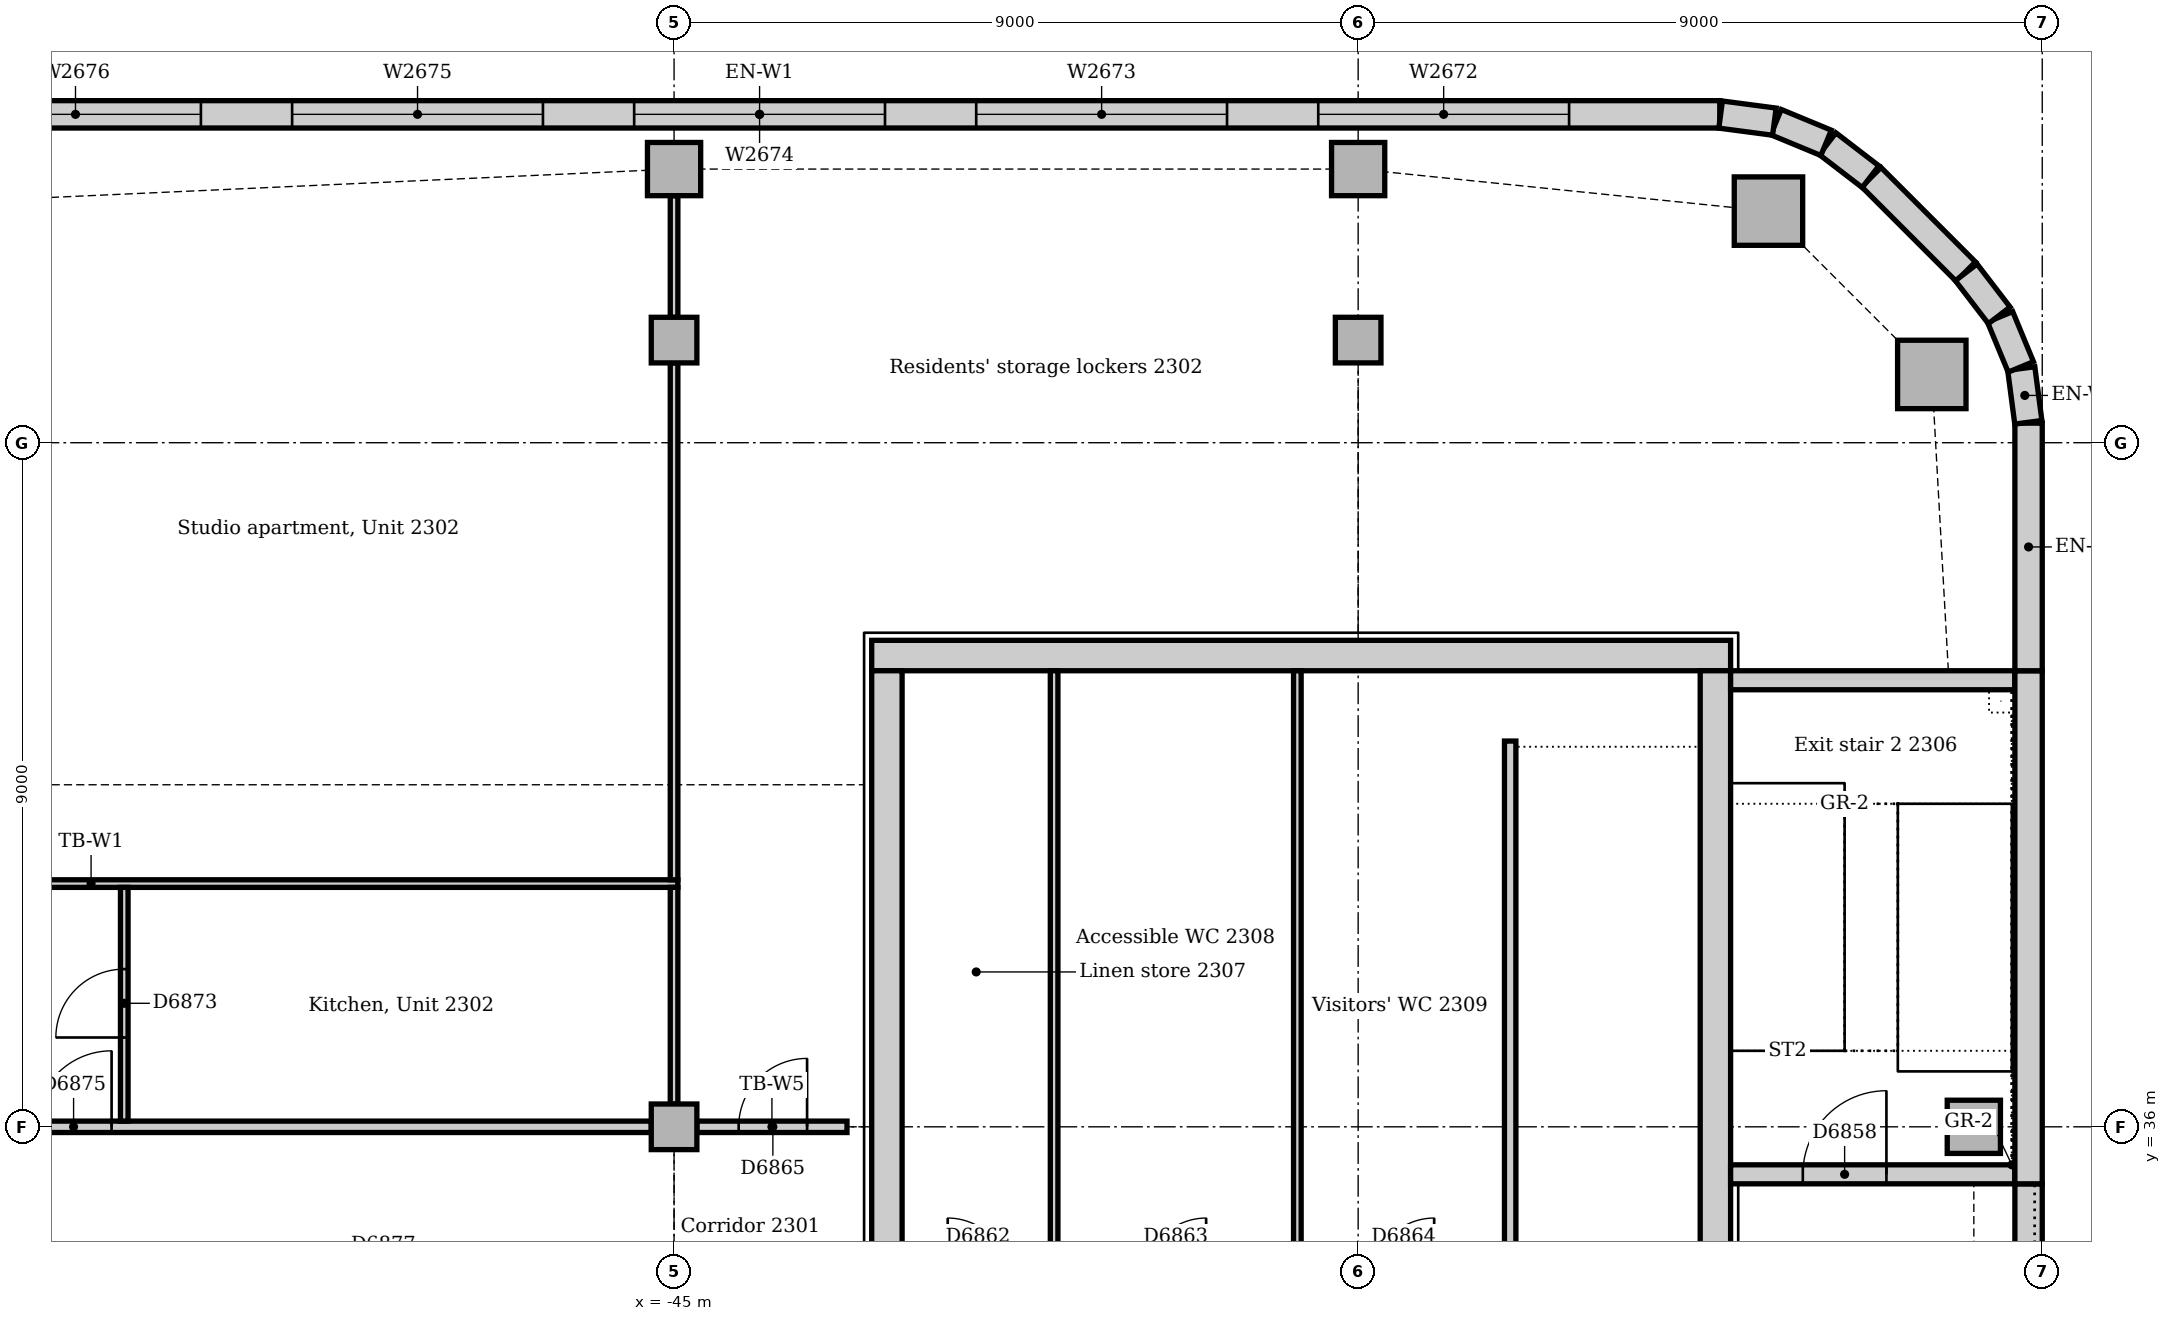
"""IFC4 building model, lengths in metres.
Left out: names, types, materials, properties, quantities, classifications, styles, units other than length and angle.
Written with IfcOpenShell. Run it as: python <this file> out.ifc"""

import sys

from ifc_helpers import new_model, si_unit, direction, frame, frame_2d, origin, origin_2d, place, context, subcontext, project, spatial, rectangle, extrude, element, fill, save


model = new_model("IFC4")
c1 = context("Model", 3, precision=1e-05, world=origin(), true_north=direction((0.0, 1.0)))
c2 = subcontext(c1, "Body", "Model", "MODEL_VIEW")
j1 = project(units=[si_unit("LENGTHUNIT", "METRE"), si_unit("PLANEANGLEUNIT", "RADIAN")], contexts=[c1])
p1 = place(None, origin())
s1 = spatial("IfcSite", under=j1, at=p1, CompositionType="ELEMENT")
p2 = place(p1, origin())
s2 = spatial("IfcBuilding", under=s1, at=p2, CompositionType="ELEMENT")
p3 = place(p2, frame((0.0, 0.0, 100.0)))
s3 = spatial("IfcBuildingStorey", under=s2, at=p3, CompositionType="ELEMENT", Elevation=100.0)
p4 = place(p3, frame((-31.1, 42.2, 0.0), z_axis=(0.0, 0.0, 1.0), x_axis=(-1.0, 0.0, 0.0)))
e1 = element("IfcWall", 1, at=p4, inside=s3, PredefinedType="SOLIDWALL", context=c2, shape_type="SweptSolid", body=[
    extrude(rectangle(XDim=11.3, YDim=0.4, at=frame_2d((5.65, 0.0))), origin(), (0.0, 0.0, 1.0), 4.0),
])
p5 = place(p3, frame((-31.3, 30.5, 0.0), z_axis=(0.0, 0.0, 1.0), x_axis=(0.0, 1.0, 0.0)))
e2 = element("IfcWall", 2, at=p5, inside=s3, PredefinedType="SOLIDWALL", context=c2, shape_type="SweptSolid", body=[
    extrude(rectangle(XDim=11.5, YDim=0.4, at=frame_2d((5.75, 0.0))), origin(), (0.0, 0.0, 1.0), 4.0),
])
p6 = place(p5, frame((0.85, 0.0, 0.0)))
e3 = element("IfcOpeningElement", 3, at=p6, cuts=e2, PredefinedType="OPENING", context=c2, shape_type="SweptSolid", body=[
    extrude(rectangle(XDim=1.8, YDim=2.1, at=frame_2d((0.9, 1.05))), frame((0.0, 0.21, 0.0), z_axis=(0.0, -1.0, 0.0), x_axis=(1.0, 0.0, 0.0)), (0.0, 0.0, 1.0), 0.42),
])
p7 = place(p3, frame((-42.2, 42.0, 0.0), z_axis=(0.0, 0.0, 1.0), x_axis=(0.0, -1.0, 0.0)))
e4 = element("IfcWall", 4, at=p7, inside=s3, PredefinedType="SOLIDWALL", context=c2, shape_type="SweptSolid", body=[
    extrude(rectangle(XDim=11.5, YDim=0.4, at=frame_2d((5.75, 0.0))), origin(), (0.0, 0.0, 1.0), 4.0),
])
p8 = place(p7, frame((8.85, 0.0, 0.0)))
e5 = element("IfcOpeningElement", 5, at=p8, cuts=e4, PredefinedType="OPENING", context=c2, shape_type="SweptSolid", body=[
    extrude(rectangle(XDim=1.8, YDim=2.1, at=frame_2d((0.9, 1.05))), frame((0.0, 0.21, 0.0), z_axis=(0.0, -1.0, 0.0), x_axis=(1.0, 0.0, 0.0)), (0.0, 0.0, 1.0), 0.42),
])
p9 = place(p3, frame((-31.1, 35.375, 0.0), z_axis=(0.0, 0.0, 1.0), x_axis=(1.0, 0.0, 0.0)))
e6 = element("IfcWall", 6, at=p9, inside=s3, PredefinedType="SOLIDWALL", context=c2, shape_type="SweptSolid", body=[
    extrude(rectangle(XDim=3.74, YDim=0.25, at=frame_2d((1.87, 0.0))), origin(), (0.0, 0.0, 1.0), 4.0),
])
p10 = place(p9, frame((0.95, 0.0, 0.0)))
e7 = element("IfcOpeningElement", 7, at=p10, cuts=e6, PredefinedType="OPENING", context=c2, shape_type="SweptSolid", body=[
    extrude(rectangle(XDim=1.1, YDim=2.1, at=frame_2d((0.55, 1.05))), frame((0.0, 0.135, 0.0), z_axis=(0.0, -1.0, 0.0), x_axis=(1.0, 0.0, 0.0)), (0.0, 0.0, 1.0), 0.27),
])
p11 = place(p3, frame((-27.36, 41.875, 0.0), z_axis=(0.0, 0.0, 1.0), x_axis=(-1.0, 0.0, 0.0)))
e8 = element("IfcWall", 8, at=p11, inside=s3, PredefinedType="SOLIDWALL", context=c2, shape_type="SweptSolid", body=[
    extrude(rectangle(XDim=3.74, YDim=0.25, at=frame_2d((1.87, 0.0))), origin(), (0.0, 0.0, 1.0), 4.0),
])
for number, where, z_axis, x_axis in (
    (9, (-28.453, 45.898, -0.15), (0.0, 0.0, 1.0), (1.0, 0.0, 0.0)),
    (10, (-30.602, 48.047, -0.15), (0.0, 0.0, 1.0), (1.0, 0.0, 0.0)),
):
    element("IfcColumn", number, at=place(p3, frame(where, z_axis=z_axis, x_axis=x_axis)), inside=s3, PredefinedType="COLUMN", context=c2, shape_type="SweptSolid", body=[
        extrude(rectangle(XDim=0.9, YDim=0.9, at=origin_2d()), origin(), (0.0, 0.0, 1.0), 4.0),
    ])
for number, where, z_axis, x_axis in (
    (11, (-27.9, 36.0, 0.0), (0.0, 0.0, 1.0), (1.0, 0.0, 0.0)),
    (12, (-45.0, 48.6, -0.15), (0.0, 0.0, 1.0), (1.0, 0.0, 0.0)),
    (13, (-36.0, 48.6, -0.15), (0.0, 0.0, 1.0), (1.0, 0.0, 0.0)),
):
    element("IfcColumn", number, at=place(p3, frame(where, z_axis=z_axis, x_axis=x_axis)), inside=s3, PredefinedType="COLUMN", context=c2, shape_type="SweptSolid", body=[
        extrude(rectangle(XDim=0.7, YDim=0.7, at=origin_2d()), origin(), (0.0, 0.0, 1.0), 4.0),
    ])
for number, where, z_axis, x_axis in (
    (14, (-45.0, 36.0, 0.0), (0.0, 0.0, 1.0), (1.0, 0.0, 0.0)),
    (15, (-45.0, 46.35, 0.0), (0.0, 0.0, 1.0), (1.0, 0.0, 0.0)),
    (16, (-36.0, 46.35, 0.0), (0.0, 0.0, 1.0), (1.0, 0.0, 0.0)),
):
    element("IfcColumn", number, at=place(p3, frame(where, z_axis=z_axis, x_axis=x_axis)), inside=s3, PredefinedType="COLUMN", context=c2, shape_type="SweptSolid", body=[
        extrude(rectangle(XDim=0.6, YDim=0.6, at=origin_2d()), origin(), (0.0, 0.0, 1.0), 3.85),
    ])
p12 = place(p3, frame((-27.18, 27.75, 0.0), z_axis=(0.0, 0.0, 1.0), x_axis=(0.0, 1.0, 0.0)))
e17 = element("IfcWall", 17, at=p12, inside=s3, PredefinedType="STANDARD", context=c2, shape_type="SweptSolid", body=[
    extrude(rectangle(XDim=7.5, YDim=0.36, at=frame_2d((3.75, 0.0))), origin(), (0.0, 0.0, 1.0), 3.85),
])
p13 = place(p12, frame((2.85, 0.0, 1.2)))
e18 = element("IfcOpeningElement", 18, at=p13, cuts=e17, PredefinedType="OPENING", context=c2, shape_type="SweptSolid", body=[
    extrude(rectangle(XDim=1.8, YDim=1.2, at=frame_2d((0.9, 0.6))), frame((0.0, 0.19, 0.0), z_axis=(0.0, -1.0, 0.0), x_axis=(1.0, 0.0, 0.0)), (0.0, 0.0, 1.0), 0.38),
])
p14 = place(p3, frame((-27.18, 35.25, 0.0), z_axis=(0.0, 0.0, 1.0), x_axis=(0.0, 1.0, 0.0)))
e19 = element("IfcWall", 19, at=p14, inside=s3, PredefinedType="STANDARD", context=c2, shape_type="SweptSolid", body=[
    extrude(rectangle(XDim=6.75, YDim=0.36, at=frame_2d((3.375, 0.0))), origin(), (0.0, 0.0, 1.0), 3.85),
])
p15 = place(p3, frame((-27.18, 42.0, 0.0), z_axis=(0.0, 0.0, 1.0), x_axis=(0.0, 1.0, 0.0)))
e20 = element("IfcWall", 20, at=p15, inside=s3, PredefinedType="STANDARD", context=c2, shape_type="SweptSolid", body=[
    extrude(rectangle(XDim=3.257, YDim=0.36, at=frame_2d((1.629, 0.0))), origin(), (0.0, 0.0, 1.0), 3.85),
])
p16 = place(p3, frame((-28.006, 47.251, 0.0), z_axis=(0.0, 0.0, 1.0), x_axis=(-0.707106781187, 0.707106781187, 0.0)))
e21 = element("IfcWall", 21, at=p16, inside=s3, PredefinedType="STANDARD", context=c2, shape_type="SweptSolid", body=[
    extrude(rectangle(XDim=1.757, YDim=0.36, at=frame_2d((0.879, 0.0))), origin(), (0.0, 0.0, 1.0), 3.85),
])
p17 = place(p3, frame((-31.243, 49.32, 0.0), z_axis=(0.0, 0.0, 1.0), x_axis=(-1.0, 0.0, 0.0)))
e22 = element("IfcWall", 22, at=p17, inside=s3, PredefinedType="STANDARD", context=c2, shape_type="SweptSolid", body=[
    extrude(rectangle(XDim=25.265, YDim=0.36, at=frame_2d((12.632, 0.0))), origin(), (0.0, 0.0, 1.0), 3.85),
])
p18 = place(p17, frame((1.982, 0.0, 0.9)))
e23 = element("IfcOpeningElement", 23, at=p18, cuts=e22, PredefinedType="OPENING", context=c2, shape_type="SweptSolid", body=[
    extrude(rectangle(XDim=3.3, YDim=1.6, at=frame_2d((1.65, 0.8))), frame((0.0, 0.19, 0.0), z_axis=(0.0, -1.0, 0.0), x_axis=(1.0, 0.0, 0.0)), (0.0, 0.0, 1.0), 0.38),
])
p19 = place(p17, frame((6.482, 0.0, 0.9)))
e24 = element("IfcOpeningElement", 24, at=p19, cuts=e22, PredefinedType="OPENING", context=c2, shape_type="SweptSolid", body=[
    extrude(rectangle(XDim=3.3, YDim=1.6, at=frame_2d((1.65, 0.8))), frame((0.0, 0.19, 0.0), z_axis=(0.0, -1.0, 0.0), x_axis=(1.0, 0.0, 0.0)), (0.0, 0.0, 1.0), 0.38),
])
p20 = place(p17, frame((10.982, 0.0, 0.9)))
e25 = element("IfcOpeningElement", 25, at=p20, cuts=e22, PredefinedType="OPENING", context=c2, shape_type="SweptSolid", body=[
    extrude(rectangle(XDim=3.3, YDim=1.6, at=frame_2d((1.65, 0.8))), frame((0.0, 0.19, 0.0), z_axis=(0.0, -1.0, 0.0), x_axis=(1.0, 0.0, 0.0)), (0.0, 0.0, 1.0), 0.38),
])
p21 = place(p17, frame((15.482, 0.0, 0.9)))
e26 = element("IfcOpeningElement", 26, at=p21, cuts=e22, PredefinedType="OPENING", context=c2, shape_type="SweptSolid", body=[
    extrude(rectangle(XDim=3.3, YDim=1.6, at=frame_2d((1.65, 0.8))), frame((0.0, 0.19, 0.0), z_axis=(0.0, -1.0, 0.0), x_axis=(1.0, 0.0, 0.0)), (0.0, 0.0, 1.0), 0.38),
])
p22 = place(p17, frame((19.982, 0.0, 0.9)))
e27 = element("IfcOpeningElement", 27, at=p22, cuts=e22, PredefinedType="OPENING", context=c2, shape_type="SweptSolid", body=[
    extrude(rectangle(XDim=3.3, YDim=1.6, at=frame_2d((1.65, 0.8))), frame((0.0, 0.19, 0.0), z_axis=(0.0, -1.0, 0.0), x_axis=(1.0, 0.0, 0.0)), (0.0, 0.0, 1.0), 0.38),
])
for number, where, z_axis, x_axis in (
    (28, (-27.183, 45.269, 0.0), (0.0, 0.0, 1.0), (-0.131, 0.991, 0.0)),
    (29, (-27.282, 45.997, 0.0), (0.0, 0.0, 1.0), (-0.383, 0.924, 0.0)),
):
    element("IfcWall", number, at=place(p3, frame(where, z_axis=z_axis, x_axis=x_axis)), inside=s3, PredefinedType="STANDARD", context=c2, shape_type="SweptSolid", body=[
        extrude(rectangle(XDim=0.713, YDim=0.36, at=frame_2d((0.356, 0.0))), origin(), (0.0, 0.0, 1.0), 3.85),
    ])
for number, where, z_axis, x_axis in (
    (30, (-27.566, 46.675, 0.0), (0.0, 0.0, 1.0), (-0.609, 0.793, 0.0)),
    (31, (-29.259, 48.5, 0.0), (0.0, 0.0, 1.0), (-0.793, 0.609, 0.0)),
):
    element("IfcWall", number, at=place(p3, frame(where, z_axis=z_axis, x_axis=x_axis)), inside=s3, PredefinedType="STANDARD", context=c2, shape_type="SweptSolid", body=[
        extrude(rectangle(XDim=0.713, YDim=0.36, at=frame_2d((0.357, 0.0))), origin(), (0.0, 0.0, 1.0), 3.85),
    ])
for number, where, z_axis, x_axis in (
    (32, (-29.844, 48.945, 0.0), (0.0, 0.0, 1.0), (-0.924, 0.383, 0.0)),
    (33, (-30.524, 49.224, 0.0), (0.0, 0.0, 1.0), (-0.991, 0.131, 0.0)),
):
    element("IfcWall", number, at=place(p3, frame(where, z_axis=z_axis, x_axis=x_axis)), inside=s3, PredefinedType="STANDARD", context=c2, shape_type="SweptSolid", body=[
        extrude(rectangle(XDim=0.713, YDim=0.36, at=frame_2d((0.356, 0.0))), origin(), (0.0, 0.0, 1.0), 3.85),
    ])
p23 = place(p3, frame((-34.0, 41.075, 0.0), z_axis=(0.0, 0.0, 1.0), x_axis=(0.0, -1.0, 0.0)))
e34 = element("IfcWall", 34, at=p23, inside=s3, PredefinedType="SOLIDWALL", context=c2, shape_type="SweptSolid", body=[
    extrude(rectangle(XDim=7.0, YDim=0.15, at=frame_2d((3.5, 0.0))), origin(), (0.0, 0.0, 1.0), 4.0),
])
for number, where, z_axis, x_axis in (
    (35, (-40.0, 34.075, 0.0), (0.0, 0.0, 1.0), (0.0, 1.0, 0.0)),
    (36, (-36.8, 34.075, 0.0), (0.0, 0.0, 1.0), (0.0, 1.0, 0.0)),
):
    element("IfcWall", number, at=place(p3, frame(where, z_axis=z_axis, x_axis=x_axis)), inside=s3, PredefinedType="PARTITIONING", context=c2, shape_type="SweptSolid", body=[
        extrude(rectangle(XDim=7.925, YDim=0.1, at=frame_2d((3.962, 0.0))), origin(), (0.0, 0.0, 1.0), 3.85),
    ])
p24 = place(p3, frame((-44.7, 36.0, 0.0), z_axis=(0.0, 0.0, 1.0), x_axis=(1.0, 0.0, 0.0)))
e37 = element("IfcWall", 37, at=p24, inside=s3, PredefinedType="PARTITIONING", context=c2, shape_type="SweptSolid", body=[
    extrude(rectangle(XDim=1.975, YDim=0.15, at=frame_2d((0.988, 0.0))), origin(), (0.0, 0.0, 1.0), 3.602),
])
p25 = place(p24, frame((0.55, 0.0, 0.0)))
e38 = element("IfcOpeningElement", 38, at=p25, cuts=e37, PredefinedType="OPENING", context=c2, shape_type="SweptSolid", body=[
    extrude(rectangle(XDim=0.9, YDim=2.1, at=frame_2d((0.45, 1.05))), frame((0.0, 0.085, 0.0), z_axis=(0.0, -1.0, 0.0), x_axis=(1.0, 0.0, 0.0)), (0.0, 0.0, 1.0), 0.17),
])
p26 = place(p3, frame((-53.7, 36.0, 0.0), z_axis=(0.0, 0.0, 1.0), x_axis=(1.0, 0.0, 0.0)))
e39 = element("IfcWall", 39, at=p26, inside=s3, PredefinedType="PARTITIONING", context=c2, shape_type="SweptSolid", body=[
    extrude(rectangle(XDim=8.4, YDim=0.15, at=frame_2d((4.2, 0.0))), origin(), (0.0, 0.0, 1.0), 3.262),
])
p27 = place(p26, frame((0.3, 0.0, 0.0)))
e40 = element("IfcOpeningElement", 40, at=p27, cuts=e39, PredefinedType="OPENING", context=c2, shape_type="SweptSolid", body=[
    extrude(rectangle(XDim=1.0, YDim=2.1, at=frame_2d((0.5, 1.05))), frame((0.0, 0.085, 0.0), z_axis=(0.0, -1.0, 0.0), x_axis=(1.0, 0.0, 0.0)), (0.0, 0.0, 1.0), 0.17),
])
p28 = place(p3, frame((-60.39, 39.2, 0.0), z_axis=(0.0, 0.0, 1.0), x_axis=(1.0, 0.0, 0.0)))
e41 = element("IfcWall", 41, at=p28, inside=s3, PredefinedType="PARTITIONING", context=c2, shape_type="SweptSolid", body=[
    extrude(rectangle(XDim=15.44, YDim=0.1, at=frame_2d((7.72, 0.0))), origin(), (0.0, 0.0, 1.0), 3.85),
])
p29 = place(p28, frame((6.021, 0.0, 0.0)))
e42 = element("IfcOpeningElement", 42, at=p29, cuts=e41, PredefinedType="OPENING", context=c2, shape_type="SweptSolid", body=[
    extrude(rectangle(XDim=0.9, YDim=2.1, at=frame_2d((0.45, 1.05))), frame((0.0, 0.06, 0.0), z_axis=(0.0, -1.0, 0.0), x_axis=(1.0, 0.0, 0.0)), (0.0, 0.0, 1.0), 0.12),
])
p30 = place(p3, frame((-45.0, 39.25, 0.0), z_axis=(0.0, 0.0, 1.0), x_axis=(0.0, 1.0, 0.0)))
e43 = element("IfcWall", 43, at=p30, inside=s3, PredefinedType="PARTITIONING", context=c2, shape_type="SweptSolid", body=[
    extrude(rectangle(XDim=6.8, YDim=0.1, at=frame_2d((3.4, 0.0))), origin(), (0.0, 0.0, 1.0), 3.362),
])
p31 = place(p3, frame((-45.0, 36.3, 0.0), z_axis=(0.0, 0.0, 1.0), x_axis=(0.0, 1.0, 0.0)))
e44 = element("IfcWall", 44, at=p31, inside=s3, PredefinedType="PARTITIONING", context=c2, shape_type="SweptSolid", body=[
    extrude(rectangle(XDim=2.85, YDim=0.1, at=frame_2d((1.425, 0.0))), origin(), (0.0, 0.0, 1.0), 3.362),
])
p32 = place(p3, frame((-45.0, 46.65, 0.0), z_axis=(0.0, 0.0, 1.0), x_axis=(0.0, 1.0, 0.0)))
e45 = element("IfcWall", 45, at=p32, inside=s3, PredefinedType="PARTITIONING", context=c2, shape_type="SweptSolid", body=[
    extrude(rectangle(XDim=1.6, YDim=0.1, at=frame_2d((0.8, 0.0))), origin(), (0.0, 0.0, 1.0), 3.652),
])
p33 = place(p3, frame((-52.233, 36.075, 0.0), z_axis=(0.0, 0.0, 1.0), x_axis=(0.0, 1.0, 0.0)))
e46 = element("IfcWall", 46, at=p33, inside=s3, PredefinedType="PARTITIONING", context=c2, shape_type="SweptSolid", body=[
    extrude(rectangle(XDim=3.075, YDim=0.1, at=frame_2d((1.538, 0.0))), origin(), (0.0, 0.0, 1.0), 3.85),
])
p34 = place(p33, frame((1.1, 0.0, 0.0)))
e47 = element("IfcOpeningElement", 47, at=p34, cuts=e46, PredefinedType="OPENING", context=c2, shape_type="SweptSolid", body=[
    extrude(rectangle(XDim=0.9, YDim=2.1, at=frame_2d((0.45, 1.05))), frame((0.0, 0.06, 0.0), z_axis=(0.0, -1.0, 0.0), x_axis=(1.0, 0.0, 0.0)), (0.0, 0.0, 1.0), 0.12),
])
p35 = place(p18, origin())
e48 = element("IfcWindow", 48, at=p35, inside=s3, PartitioningType="SINGLE_PANEL", PredefinedType="WINDOW", context=c2, shape_type="SweptSolid", body=[
    extrude(rectangle(XDim=3.3, YDim=1.6, at=frame_2d((1.65, 0.8))), frame((0.0, 0.13, 0.0), z_axis=(0.0, -1.0, 0.0), x_axis=(1.0, 0.0, 0.0)), (0.0, 0.0, 1.0), 0.06),
])
fill(e23, e48)
p36 = place(p19, origin())
e49 = element("IfcWindow", 49, at=p36, inside=s3, PartitioningType="SINGLE_PANEL", PredefinedType="WINDOW", context=c2, shape_type="SweptSolid", body=[
    extrude(rectangle(XDim=3.3, YDim=1.6, at=frame_2d((1.65, 0.8))), frame((0.0, 0.13, 0.0), z_axis=(0.0, -1.0, 0.0), x_axis=(1.0, 0.0, 0.0)), (0.0, 0.0, 1.0), 0.06),
])
fill(e24, e49)
p37 = place(p20, origin())
e50 = element("IfcWindow", 50, at=p37, inside=s3, PartitioningType="SINGLE_PANEL", PredefinedType="WINDOW", context=c2, shape_type="SweptSolid", body=[
    extrude(rectangle(XDim=3.3, YDim=1.6, at=frame_2d((1.65, 0.8))), frame((0.0, 0.13, 0.0), z_axis=(0.0, -1.0, 0.0), x_axis=(1.0, 0.0, 0.0)), (0.0, 0.0, 1.0), 0.06),
])
fill(e25, e50)
p38 = place(p21, origin())
e51 = element("IfcWindow", 51, at=p38, inside=s3, PartitioningType="SINGLE_PANEL", PredefinedType="WINDOW", context=c2, shape_type="SweptSolid", body=[
    extrude(rectangle(XDim=3.3, YDim=1.6, at=frame_2d((1.65, 0.8))), frame((0.0, 0.13, 0.0), z_axis=(0.0, -1.0, 0.0), x_axis=(1.0, 0.0, 0.0)), (0.0, 0.0, 1.0), 0.06),
])
fill(e26, e51)
p39 = place(p22, origin())
e52 = element("IfcWindow", 52, at=p39, inside=s3, PartitioningType="SINGLE_PANEL", PredefinedType="WINDOW", context=c2, shape_type="SweptSolid", body=[
    extrude(rectangle(XDim=3.3, YDim=1.6, at=frame_2d((1.65, 0.8))), frame((0.0, 0.13, 0.0), z_axis=(0.0, -1.0, 0.0), x_axis=(1.0, 0.0, 0.0)), (0.0, 0.0, 1.0), 0.06),
])
fill(e27, e52)
p40 = place(p10, origin())
e53 = element("IfcDoor", 53, at=p40, inside=s3, OperationType="SINGLE_SWING_RIGHT", PredefinedType="DOOR", context=c2, shape_type="SweptSolid", body=[
    extrude(rectangle(XDim=1.1, YDim=2.1, at=frame_2d((0.55, 1.05))), frame((0.0, 0.025, 0.0), z_axis=(0.0, -1.0, 0.0), x_axis=(1.0, 0.0, 0.0)), (0.0, 0.0, 1.0), 0.05),
])
fill(e7, e53)
p41 = place(p25, origin())
e54 = element("IfcDoor", 54, at=p41, inside=s3, OperationType="SINGLE_SWING_RIGHT", PredefinedType="DOOR", context=c2, shape_type="SweptSolid", body=[
    extrude(rectangle(XDim=0.9, YDim=2.1, at=frame_2d((0.45, 1.05))), frame((0.0, 0.025, 0.0), z_axis=(0.0, -1.0, 0.0), x_axis=(1.0, 0.0, 0.0)), (0.0, 0.0, 1.0), 0.05),
])
fill(e38, e54)
p42 = place(p34, origin())
e55 = element("IfcDoor", 55, at=p42, inside=s3, OperationType="SINGLE_SWING_LEFT", PredefinedType="DOOR", context=c2, shape_type="SweptSolid", body=[
    extrude(rectangle(XDim=0.9, YDim=2.1, at=frame_2d((0.45, 1.05))), frame((0.0, 0.025, 0.0), z_axis=(0.0, -1.0, 0.0), x_axis=(1.0, 0.0, 0.0)), (0.0, 0.0, 1.0), 0.05),
])
fill(e47, e55)
p43 = place(p27, origin())
e56 = element("IfcDoor", 56, at=p43, inside=s3, OperationType="SINGLE_SWING_RIGHT", PredefinedType="DOOR", context=c2, shape_type="SweptSolid", body=[
    extrude(rectangle(XDim=1.0, YDim=2.1, at=frame_2d((0.5, 1.05))), frame((0.0, 0.025, 0.0), z_axis=(0.0, -1.0, 0.0), x_axis=(1.0, 0.0, 0.0)), (0.0, 0.0, 1.0), 0.05),
])
fill(e40, e56)
save(model, sys.argv[1])
